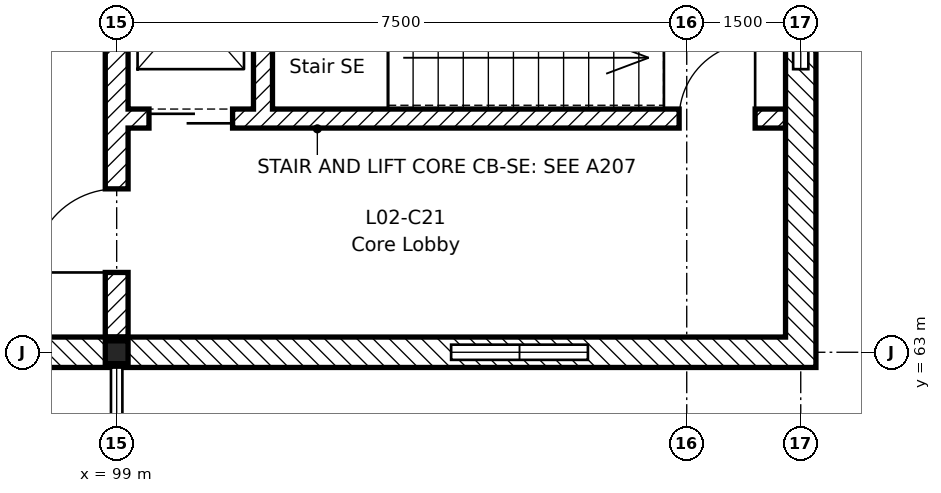
"""IFC4 building model, lengths in metres.
Left out: names, types, materials, properties, quantities, classifications, styles, units other than length and angle.
Written with IfcOpenShell. Run it as: python <this file> out.ifc"""

import sys

from ifc_helpers import new_model, si_unit, direction, frame, frame_2d, origin, origin_2d, place, context, subcontext, project, spatial, rectangle, i_section, extrude, element, fill, save


model = new_model("IFC4")
c1 = context("Model", 3, precision=1e-05, world=origin(), true_north=direction((0.0, 1.0)))
c2 = subcontext(c1, "Body", "Model", "MODEL_VIEW")
j1 = project(units=[si_unit("LENGTHUNIT", "METRE"), si_unit("PLANEANGLEUNIT", "RADIAN")], contexts=[c1])
p1 = place(None, origin())
s1 = spatial("IfcSite", under=j1, at=p1, CompositionType="ELEMENT")
p2 = place(p1, origin())
s2 = spatial("IfcBuilding", under=s1, at=p2, CompositionType="ELEMENT")
p3 = place(p2, frame((0.0, 0.0, 9.9)))
s3 = spatial("IfcBuildingStorey", under=s2, at=p3, CompositionType="ELEMENT", Elevation=9.9)
p4 = place(p3, frame((99.0, 63.0, -0.2), z_axis=(0.0, 0.0, 1.0), x_axis=(1.0, 0.0, 0.0)))
e1 = element("IfcColumn", 1, at=p4, inside=s3, PredefinedType="COLUMN", context=c2, shape_type="SweptSolid", body=[
    extrude(i_section(OverallWidth=0.3, OverallDepth=0.3, WebThickness=0.011, FlangeThickness=0.019, FilletRadius=0.027, at=origin_2d()), origin(), (0.0, 0.0, 1.0), 4.45),
])
p5 = place(p3, frame((99.0, 63.2, 0.0), z_axis=(0.0, 0.0, 1.0), x_axis=(0.0, 1.0, 0.0)))
e2 = element("IfcWall", 2, at=p5, inside=s3, PredefinedType="SHEAR", context=c2, shape_type="SweptSolid", body=[
    extrude(rectangle(XDim=8.95, YDim=0.3, at=frame_2d((4.475, 0.0))), origin(), (0.0, 0.0, 1.0), 4.3),
])
p6 = place(p5, frame((0.85, 0.0, 0.0)))
e3 = element("IfcOpeningElement", 3, at=p6, cuts=e2, PredefinedType="OPENING", context=c2, shape_type="SweptSolid", body=[
    extrude(rectangle(XDim=1.1, YDim=2.1, at=frame_2d((0.55, 1.05))), frame((0.0, 0.16, 0.0), z_axis=(0.0, -1.0, 0.0), x_axis=(1.0, 0.0, 0.0)), (0.0, 0.0, 1.0), 0.32),
])
p7 = place(p3, frame((107.8, 66.075, 0.0), z_axis=(0.0, 0.0, 1.0), x_axis=(-1.0, 0.0, 0.0)))
e4 = element("IfcWall", 4, at=p7, inside=s3, PredefinedType="SHEAR", context=c2, shape_type="SweptSolid", body=[
    extrude(rectangle(XDim=8.65, YDim=0.25, at=frame_2d((4.325, 0.0))), origin(), (0.0, 0.0, 1.0), 4.3),
])
p8 = place(p7, frame((0.4, 0.0, 0.0)))
e5 = element("IfcOpeningElement", 5, at=p8, cuts=e4, PredefinedType="OPENING", context=c2, shape_type="SweptSolid", body=[
    extrude(rectangle(XDim=1.0, YDim=2.1, at=frame_2d((0.5, 1.05))), frame((0.0, 0.135, 0.0), z_axis=(0.0, -1.0, 0.0), x_axis=(1.0, 0.0, 0.0)), (0.0, 0.0, 1.0), 0.27),
])
p9 = place(p7, frame((7.275, 0.0, 0.0)))
e6 = element("IfcOpeningElement", 6, at=p9, cuts=e4, PredefinedType="OPENING", context=c2, shape_type="SweptSolid", body=[
    extrude(rectangle(XDim=1.1, YDim=2.1, at=frame_2d((0.55, 1.05))), frame((0.0, 0.135, 0.0), z_axis=(0.0, -1.0, 0.0), x_axis=(1.0, 0.0, 0.0)), (0.0, 0.0, 1.0), 0.27),
])
p10 = place(p3, frame((100.925, 66.2, 0.0), z_axis=(0.0, 0.0, 1.0), x_axis=(0.0, 1.0, 0.0)))
e7 = element("IfcWall", 7, at=p10, inside=s3, PredefinedType="SHEAR", context=c2, shape_type="SweptSolid", body=[
    extrude(rectangle(XDim=2.85, YDim=0.25, at=frame_2d((1.425, 0.0))), origin(), (0.0, 0.0, 1.0), 4.3),
])
p11 = place(p3, frame((72.0, 63.0, 0.0), z_axis=(0.0, 0.0, 1.0), x_axis=(1.0, 0.0, 0.0)))
e8 = element("IfcWall", 8, at=p11, inside=s3, PredefinedType="STANDARD", context=c2, shape_type="SweptSolid", body=[
    extrude(rectangle(XDim=27.0, YDim=0.4, at=frame_2d((13.5, 0.0))), origin(), (0.0, 0.0, 1.0), 3.76),
])
p12 = place(p3, frame((99.0, 63.0, 0.0), z_axis=(0.0, 0.0, 1.0), x_axis=(1.0, 0.0, 0.0)))
e9 = element("IfcWall", 9, at=p12, inside=s3, PredefinedType="STANDARD", context=c2, shape_type="SweptSolid", body=[
    extrude(rectangle(XDim=4.4, YDim=0.4, at=frame_2d((2.2, 0.0))), origin(), (0.0, 0.0, 1.0), 4.3),
])
p13 = place(p3, frame((105.2, 63.0, 0.0), z_axis=(0.0, 0.0, 1.0), x_axis=(1.0, 0.0, 0.0)))
e10 = element("IfcWall", 10, at=p13, inside=s3, PredefinedType="STANDARD", context=c2, shape_type="SweptSolid", body=[
    extrude(rectangle(XDim=3.0, YDim=0.4, at=frame_2d((1.5, 0.0))), origin(), (0.0, 0.0, 1.0), 4.3),
])
p14 = place(p3, frame((103.4, 63.0, 0.0), z_axis=(0.0, 0.0, 1.0), x_axis=(1.0, 0.0, 0.0)))
e11 = element("IfcWall", 11, at=p14, inside=s3, PredefinedType="STANDARD", context=c2, shape_type="SweptSolid", body=[
    extrude(rectangle(XDim=1.8, YDim=0.4, at=frame_2d((0.9, 0.0))), origin(), (0.0, 0.0, 1.0), 0.9),
])
p15 = place(p3, frame((108.0, 63.2, 0.0), z_axis=(0.0, 0.0, 1.0), x_axis=(0.0, 1.0, 0.0)))
e12 = element("IfcWall", 12, at=p15, inside=s3, PredefinedType="STANDARD", context=c2, shape_type="SweptSolid", body=[
    extrude(rectangle(XDim=3.525, YDim=0.4, at=frame_2d((1.763, 0.0))), origin(), (0.0, 0.0, 1.0), 4.3),
])
p16 = place(p3, frame((108.0, 66.725, 0.0), z_axis=(0.0, 0.0, 1.0), x_axis=(0.0, 1.0, 0.0)))
e13 = element("IfcWall", 13, at=p16, inside=s3, PredefinedType="STANDARD", context=c2, shape_type="SweptSolid", body=[
    extrude(rectangle(XDim=1.8, YDim=0.4, at=frame_2d((0.9, 0.0))), origin(), (0.0, 0.0, 1.0), 0.9),
])
p17 = place(p8, frame((1.0, 0.0, 0.0), z_axis=(0.0, 0.0, 1.0), x_axis=(-1.0, 0.0, 0.0)))
e14 = element("IfcDoor", 14, at=p17, inside=s3, OperationType="SINGLE_SWING_RIGHT", PredefinedType="DOOR", context=c2, shape_type="SweptSolid", body=[
    extrude(rectangle(XDim=1.0, YDim=2.1, at=frame_2d((0.5, 1.05))), frame((0.0, 0.025, 0.0), z_axis=(0.0, -1.0, 0.0), x_axis=(1.0, 0.0, 0.0)), (0.0, 0.0, 1.0), 0.05),
])
fill(e5, e14)
p18 = place(p6, origin())
e15 = element("IfcDoor", 15, at=p18, inside=s3, OperationType="SINGLE_SWING_LEFT", PredefinedType="DOOR", context=c2, shape_type="SweptSolid", body=[
    extrude(rectangle(XDim=1.1, YDim=2.1, at=frame_2d((0.55, 1.05))), frame((0.0, 0.025, 0.0), z_axis=(0.0, -1.0, 0.0), x_axis=(1.0, 0.0, 0.0)), (0.0, 0.0, 1.0), 0.05),
])
fill(e3, e15)
p19 = place(p9, origin())
e16 = element("IfcDoor", 16, at=p19, inside=s3, OperationType="SLIDING_TO_LEFT", PredefinedType="DOOR", context=c2, shape_type="SweptSolid", body=[
    extrude(rectangle(XDim=1.1, YDim=2.1, at=frame_2d((0.55, 1.05))), frame((0.0, 0.025, 0.0), z_axis=(0.0, -1.0, 0.0), x_axis=(1.0, 0.0, 0.0)), (0.0, 0.0, 1.0), 0.05),
])
fill(e6, e16)
save(model, sys.argv[1])
